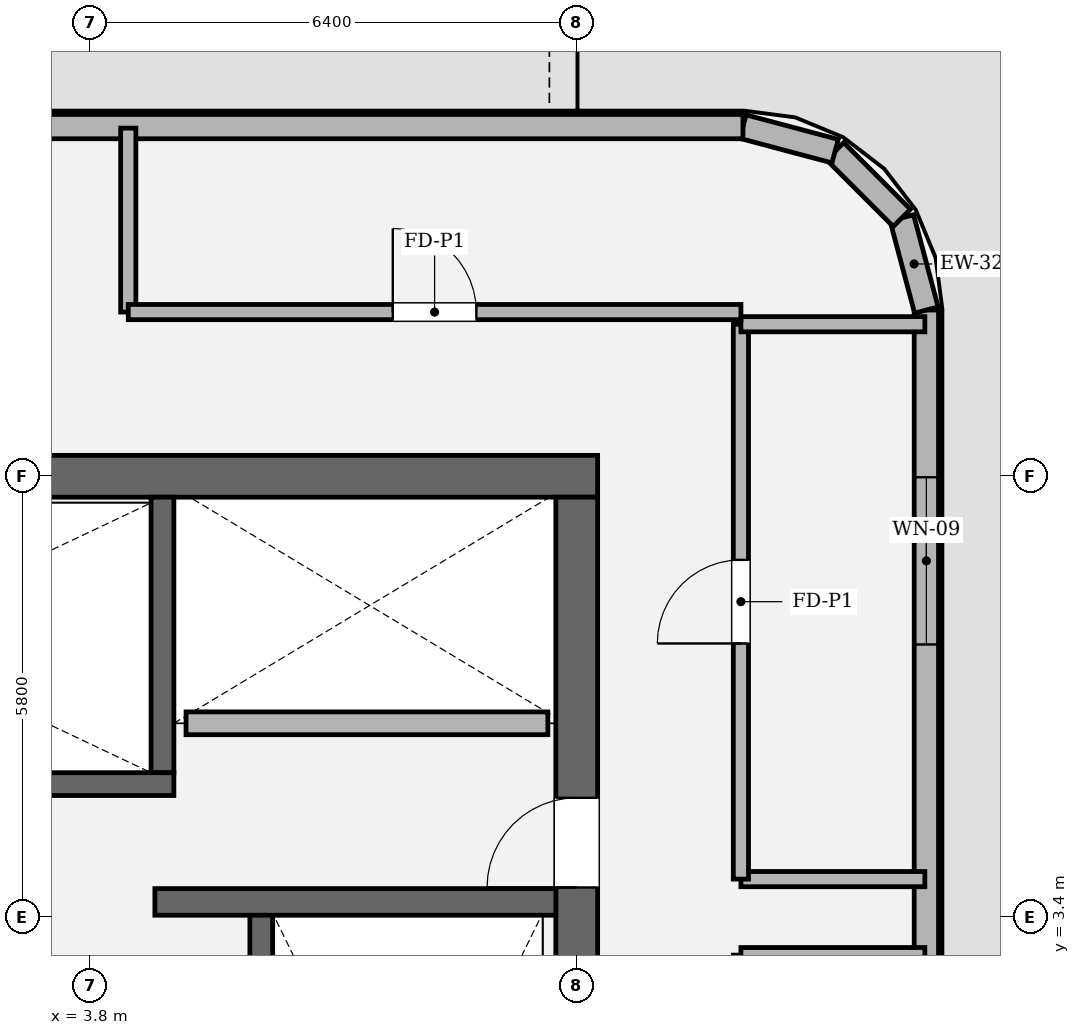
"""IFC4 building model, lengths in metres.
Left out: names, types, materials, properties, quantities, classifications, styles, units other than length and angle.
Written with IfcOpenShell. Run it as: python <this file> out.ifc"""

import sys

from ifc_helpers import new_model, si_unit, direction, frame, frame_2d, origin, place, context, subcontext, project, spatial, rectangle, extrude, element, fill, save


model = new_model("IFC4")
c1 = context("Model", 3, precision=1e-05, world=origin(), true_north=direction((0.0, 1.0)))
c2 = subcontext(c1, "Body", "Model", "MODEL_VIEW")
j1 = project(units=[si_unit("LENGTHUNIT", "METRE"), si_unit("PLANEANGLEUNIT", "RADIAN")], contexts=[c1])
p1 = place(None, origin())
s1 = spatial("IfcSite", under=j1, at=p1, CompositionType="ELEMENT")
p2 = place(p1, origin())
s2 = spatial("IfcBuilding", under=s1, at=p2, CompositionType="ELEMENT")
p3 = place(p2, frame((0.0, 0.0, 237.0)))
s3 = spatial("IfcBuildingStorey", under=s2, at=p3, CompositionType="ELEMENT", Elevation=237.0)
p4 = place(p3, frame((-10.475, 9.2, 0.0), z_axis=(0.0, 0.0, 1.0), x_axis=(1.0, 0.0, 0.0)))
e1 = element("IfcWall", 1, at=p4, inside=s3, PredefinedType="SHEAR", context=c2, shape_type="SweptSolid", body=[
    extrude(rectangle(XDim=20.95, YDim=0.55, at=frame_2d((10.475, 0.0))), origin(), (0.0, 0.0, 1.0), 4.8),
])
p5 = place(p3, frame((10.2, 8.925, 0.0), z_axis=(0.0, 0.0, 1.0), x_axis=(0.0, -1.0, 0.0)))
e2 = element("IfcWall", 2, at=p5, inside=s3, PredefinedType="SHEAR", context=c2, shape_type="SweptSolid", body=[
    extrude(rectangle(XDim=17.85, YDim=0.55, at=frame_2d((8.925, 0.0))), origin(), (0.0, 0.0, 1.0), 4.8),
])
p6 = place(p5, frame((3.955, 0.0, 0.0)))
e3 = element("IfcOpeningElement", 3, at=p6, cuts=e2, PredefinedType="OPENING", context=c2, shape_type="SweptSolid", body=[
    extrude(rectangle(XDim=1.18, YDim=2.2, at=frame_2d((0.59, 1.1))), frame((0.0, 0.285, 0.0), z_axis=(0.0, -1.0, 0.0), x_axis=(1.0, 0.0, 0.0)), (0.0, 0.0, 1.0), 0.57),
])
p7 = place(p3, frame((6.05, 3.45, 0.0), z_axis=(0.0, 0.0, 1.0), x_axis=(0.0, -1.0, 0.0)))
e4 = element("IfcWall", 4, at=p7, inside=s3, PredefinedType="SOLIDWALL", context=c2, shape_type="SweptSolid", body=[
    extrude(rectangle(XDim=8.95, YDim=0.3, at=frame_2d((4.475, 0.0))), origin(), (0.0, 0.0, 1.0), 4.8),
])
p8 = place(p3, frame((4.75, 8.925, 0.0), z_axis=(0.0, 0.0, 1.0), x_axis=(0.0, -1.0, 0.0)))
e5 = element("IfcWall", 5, at=p8, inside=s3, PredefinedType="SOLIDWALL", context=c2, shape_type="SweptSolid", body=[
    extrude(rectangle(XDim=3.625, YDim=0.3, at=frame_2d((1.812, 0.0))), origin(), (0.0, 0.0, 1.0), 4.8),
])
p9 = place(p3, frame((-4.9, 5.15, 0.0), z_axis=(0.0, 0.0, 1.0), x_axis=(1.0, 0.0, 0.0)))
e6 = element("IfcWall", 6, at=p9, inside=s3, PredefinedType="SOLIDWALL", context=c2, shape_type="SweptSolid", body=[
    extrude(rectangle(XDim=9.8, YDim=0.3, at=frame_2d((4.9, 0.0))), origin(), (0.0, 0.0, 1.0), 4.8),
])
p10 = place(p9, frame((0.56, 0.0, 0.0)))
e7 = element("IfcOpeningElement", 7, at=p10, cuts=e6, PredefinedType="OPENING", context=c2, shape_type="SweptSolid", body=[
    extrude(rectangle(XDim=1.18, YDim=2.2, at=frame_2d((0.59, 1.1))), frame((0.0, 0.16, 0.0), z_axis=(0.0, -1.0, 0.0), x_axis=(1.0, 0.0, 0.0)), (0.0, 0.0, 1.0), 0.32),
])
p11 = place(p3, frame((4.65, 3.6, 0.0), z_axis=(0.0, 0.0, 1.0), x_axis=(1.0, 0.0, 0.0)))
e8 = element("IfcWall", 8, at=p11, inside=s3, PredefinedType="SOLIDWALL", context=c2, shape_type="SweptSolid", body=[
    extrude(rectangle(XDim=5.275, YDim=0.35, at=frame_2d((2.638, 0.0))), origin(), (0.0, 0.0, 1.0), 4.8),
])
p12 = place(p3, frame((14.8, -11.387, 0.0), z_axis=(0.0, 0.0, 1.0), x_axis=(0.0, 1.0, 0.0)))
e9 = element("IfcWall", 9, at=p12, inside=s3, PredefinedType="SOLIDWALL", context=c2, shape_type="SweptSolid", body=[
    extrude(rectangle(XDim=22.774, YDim=0.32, at=frame_2d((11.387, 0.0))), origin(), (0.0, 0.0, 1.0), 3.194),
])
p13 = place(p12, frame((2.2, 0.0, 0.9)))
e10 = element("IfcOpeningElement", 10, at=p13, cuts=e9, PredefinedType="OPENING", context=c2, shape_type="SweptSolid", body=[
    extrude(rectangle(XDim=2.2, YDim=1.2, at=frame_2d((1.1, 0.6))), frame((0.0, 0.17, 0.0), z_axis=(0.0, -1.0, 0.0), x_axis=(1.0, 0.0, 0.0)), (0.0, 0.0, 1.0), 0.34),
])
p14 = place(p12, frame((18.374, 0.0, 0.9)))
e11 = element("IfcOpeningElement", 11, at=p14, cuts=e9, PredefinedType="OPENING", context=c2, shape_type="SweptSolid", body=[
    extrude(rectangle(XDim=2.2, YDim=1.2, at=frame_2d((1.1, 0.6))), frame((0.0, 0.17, 0.0), z_axis=(0.0, -1.0, 0.0), x_axis=(1.0, 0.0, 0.0)), (0.0, 0.0, 1.0), 0.34),
])
p15 = place(p3, frame((14.8, 11.387, 0.0), z_axis=(0.0, 0.0, 1.0), x_axis=(-0.25748094776, 0.966283375382, 0.0)))
e12 = element("IfcWall", 12, at=p15, inside=s3, PredefinedType="SOLIDWALL", context=c2, shape_type="SweptSolid", body=[
    extrude(rectangle(XDim=1.254, YDim=0.32, at=frame_2d((0.627, 0.0))), origin(), (0.0, 0.0, 1.0), 3.194),
])
p16 = place(p3, frame((14.477, 12.599, 0.0), z_axis=(0.0, 0.0, 1.0), x_axis=(-0.707106781187, 0.707106781187, 0.0)))
e13 = element("IfcWall", 13, at=p16, inside=s3, PredefinedType="SOLIDWALL", context=c2, shape_type="SweptSolid", body=[
    extrude(rectangle(XDim=1.242, YDim=0.32, at=frame_2d((0.621, 0.0))), origin(), (0.0, 0.0, 1.0), 3.194),
])
p17 = place(p3, frame((13.599, 13.477, 0.0), z_axis=(0.0, 0.0, 1.0), x_axis=(-0.966283375382, 0.25748094776, 0.0)))
e14 = element("IfcWall", 14, at=p17, inside=s3, PredefinedType="SOLIDWALL", context=c2, shape_type="SweptSolid", body=[
    extrude(rectangle(XDim=1.254, YDim=0.32, at=frame_2d((0.627, 0.0))), origin(), (0.0, 0.0, 1.0), 3.194),
])
p18 = place(p3, frame((12.387, 13.8, 0.0), z_axis=(0.0, 0.0, 1.0), x_axis=(-1.0, 0.0, 0.0)))
e15 = element("IfcWall", 15, at=p18, inside=s3, PredefinedType="SOLIDWALL", context=c2, shape_type="SweptSolid", body=[
    extrude(rectangle(XDim=24.774, YDim=0.32, at=frame_2d((12.387, 0.0))), origin(), (0.0, 0.0, 1.0), 3.194),
])
p19 = place(p18, frame((11.712, 0.0, 0.0)))
e16 = element("IfcOpeningElement", 16, at=p19, cuts=e15, PredefinedType="OPENING", context=c2, shape_type="SweptSolid", body=[
    extrude(rectangle(XDim=1.35, YDim=2.3, at=frame_2d((0.675, 1.15))), frame((0.0, 0.17, 0.0), z_axis=(0.0, -1.0, 0.0), x_axis=(1.0, 0.0, 0.0)), (0.0, 0.0, 1.0), 0.34),
])
p20 = place(p3, frame((5.06, 5.95, 0.0), z_axis=(0.0, 0.0, 1.0), x_axis=(1.0, 0.0, 0.0)))
e17 = element("IfcWall", 17, at=p20, inside=s3, PredefinedType="SOLIDWALL", context=c2, shape_type="SweptSolid", body=[
    extrude(rectangle(XDim=4.76, YDim=0.3, at=frame_2d((2.38, 0.0))), origin(), (0.0, 0.0, 1.0), 4.48),
])
for number, where, z_axis, x_axis in (
    (18, (12.36, 2.9, 0.0), (0.0, 0.0, 1.0), (1.0, 0.0, 0.0)),
    (19, (14.78, 3.9, 0.0), (0.0, 0.0, 1.0), (-1.0, 0.0, 0.0)),
):
    element("IfcWall", number, at=place(p3, frame(where, z_axis=z_axis, x_axis=x_axis)), inside=s3, PredefinedType="SOLIDWALL", context=c2, shape_type="SweptSolid", body=[
        extrude(rectangle(XDim=2.42, YDim=0.2, at=frame_2d((1.21, 0.0))), origin(), (0.0, 0.0, 1.0), 3.194),
    ])
p21 = place(p3, frame((12.36, 3.9, 0.0), z_axis=(0.0, 0.0, 1.0), x_axis=(0.0, 1.0, 0.0)))
e20 = element("IfcWall", 20, at=p21, inside=s3, PredefinedType="SOLIDWALL", context=c2, shape_type="SweptSolid", body=[
    extrude(rectangle(XDim=7.3, YDim=0.2, at=frame_2d((3.65, 0.0))), origin(), (0.0, 0.0, 1.0), 4.48),
])
p22 = place(p21, frame((3.1, 0.0, 0.0)))
e21 = element("IfcOpeningElement", 21, at=p22, cuts=e20, PredefinedType="OPENING", context=c2, shape_type="SweptSolid", body=[
    extrude(rectangle(XDim=1.1, YDim=2.2, at=frame_2d((0.55, 1.1))), frame((0.0, 0.11, 0.0), z_axis=(0.0, -1.0, 0.0), x_axis=(1.0, 0.0, 0.0)), (0.0, 0.0, 1.0), 0.22),
])
for number, where, z_axis, x_axis in (
    (22, (12.36, 11.2, 0.0), (0.0, 0.0, 1.0), (1.0, 0.0, 0.0)),
    (23, (4.3, 11.36, 0.0), (0.0, 0.0, 1.0), (0.0, 1.0, 0.0)),
):
    element("IfcWall", number, at=place(p3, frame(where, z_axis=z_axis, x_axis=x_axis)), inside=s3, PredefinedType="SOLIDWALL", context=c2, shape_type="SweptSolid", body=[
        extrude(rectangle(XDim=2.42, YDim=0.2, at=frame_2d((1.21, 0.0))), origin(), (0.0, 0.0, 1.0), 3.194),
    ])
p23 = place(p3, frame((12.36, 11.36, 0.0), z_axis=(0.0, 0.0, 1.0), x_axis=(-1.0, 0.0, 0.0)))
e24 = element("IfcWall", 24, at=p23, inside=s3, PredefinedType="SOLIDWALL", context=c2, shape_type="SweptSolid", body=[
    extrude(rectangle(XDim=8.06, YDim=0.2, at=frame_2d((4.03, 0.0))), origin(), (0.0, 0.0, 1.0), 4.48),
])
p24 = place(p23, frame((3.48, 0.0, 0.0)))
e25 = element("IfcOpeningElement", 25, at=p24, cuts=e24, PredefinedType="OPENING", context=c2, shape_type="SweptSolid", body=[
    extrude(rectangle(XDim=1.1, YDim=2.2, at=frame_2d((0.55, 1.1))), frame((0.0, 0.11, 0.0), z_axis=(0.0, -1.0, 0.0), x_axis=(1.0, 0.0, 0.0)), (0.0, 0.0, 1.0), 0.22),
])
p25 = place(p14, origin())
e26 = element("IfcWindow", 26, at=p25, inside=s3, PartitioningType="SINGLE_PANEL", PredefinedType="WINDOW", context=c2, shape_type="SweptSolid", body=[
    extrude(rectangle(XDim=2.2, YDim=1.2, at=frame_2d((1.1, 0.6))), frame((0.0, 0.03, 0.0), z_axis=(0.0, -1.0, 0.0), x_axis=(1.0, 0.0, 0.0)), (0.0, 0.0, 1.0), 0.06),
])
fill(e11, e26)
p26 = place(p6, origin())
e27 = element("IfcDoor", 27, at=p26, inside=s3, OperationType="SINGLE_SWING_RIGHT", PredefinedType="DOOR", context=c2, shape_type="SweptSolid", body=[
    extrude(rectangle(XDim=1.18, YDim=2.2, at=frame_2d((0.59, 1.1))), frame((0.0, 0.025, 0.0), z_axis=(0.0, -1.0, 0.0), x_axis=(1.0, 0.0, 0.0)), (0.0, 0.0, 1.0), 0.05),
])
fill(e3, e27)
p27 = place(p22, origin())
e28 = element("IfcDoor", 28, at=p27, inside=s3, OperationType="SINGLE_SWING_LEFT", PredefinedType="DOOR", context=c2, shape_type="SweptSolid", body=[
    extrude(rectangle(XDim=1.1, YDim=2.2, at=frame_2d((0.55, 1.1))), frame((0.0, 0.025, 0.0), z_axis=(0.0, -1.0, 0.0), x_axis=(1.0, 0.0, 0.0)), (0.0, 0.0, 1.0), 0.05),
])
fill(e21, e28)
p28 = place(p24, origin())
e29 = element("IfcDoor", 29, at=p28, inside=s3, OperationType="SINGLE_SWING_RIGHT", PredefinedType="DOOR", context=c2, shape_type="SweptSolid", body=[
    extrude(rectangle(XDim=1.1, YDim=2.2, at=frame_2d((0.55, 1.1))), frame((0.0, 0.025, 0.0), z_axis=(0.0, -1.0, 0.0), x_axis=(1.0, 0.0, 0.0)), (0.0, 0.0, 1.0), 0.05),
])
fill(e25, e29)
save(model, sys.argv[1])
